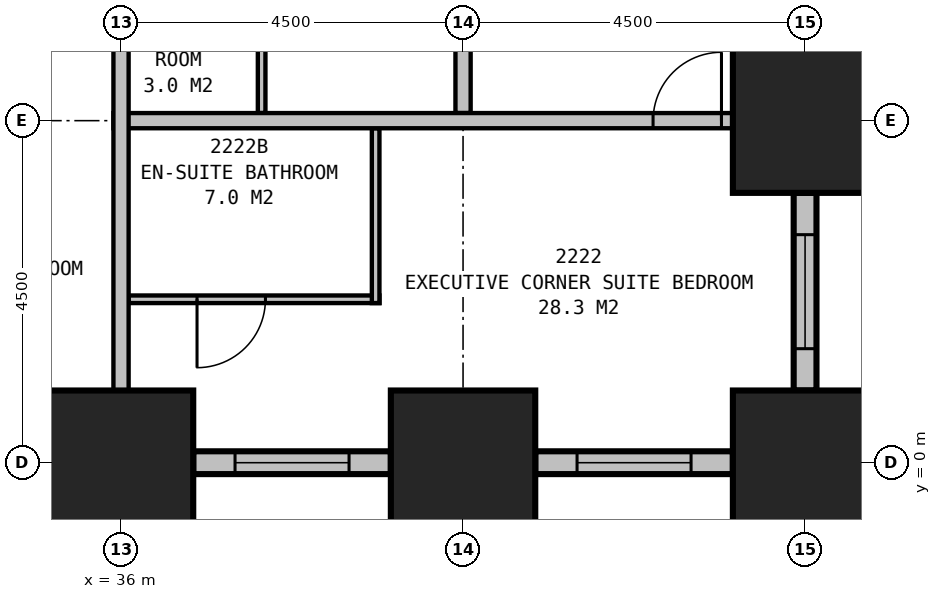
"""IFC4 building model, lengths in metres.
Left out: names, types, materials, properties, quantities, classifications, styles, units other than length and angle.
Written with IfcOpenShell. Run it as: python <this file> out.ifc"""

import sys

from ifc_helpers import new_model, si_unit, direction, frame, frame_2d, origin, origin_2d, place, context, subcontext, project, spatial, rectangle, extrude, element, fill, save


model = new_model("IFC4")
c1 = context("Model", 3, precision=1e-05, world=origin(), true_north=direction((0.0, 1.0)))
c2 = subcontext(c1, "Body", "Model", "MODEL_VIEW")
j1 = project(units=[si_unit("LENGTHUNIT", "METRE"), si_unit("PLANEANGLEUNIT", "RADIAN")], contexts=[c1])
p1 = place(None, origin())
s1 = spatial("IfcSite", under=j1, at=p1, CompositionType="ELEMENT")
p2 = place(p1, origin())
s2 = spatial("IfcBuilding", under=s1, at=p2, CompositionType="ELEMENT")
p3 = place(p2, frame((0.0, 0.0, 89.9)))
s3 = spatial("IfcBuildingStorey", under=s2, at=p3, CompositionType="ELEMENT", Elevation=89.9)
for number, where, z_axis, x_axis in (
    (1, (36.0, 0.0, 0.0), (0.0, 0.0, 1.0), (1.0, 0.0, 0.0)),
    (2, (40.5, 0.0, 0.0), (0.0, 0.0, 1.0), (1.0, 0.0, 0.0)),
    (3, (45.0, 0.0, 0.0), (0.0, 0.0, 1.0), (1.0, 0.0, 0.0)),
    (4, (45.0, 4.5, 0.0), (0.0, 0.0, 1.0), (1.0, 0.0, 0.0)),
):
    element("IfcColumn", number, at=place(p3, frame(where, z_axis=z_axis, x_axis=x_axis)), inside=s3, PredefinedType="COLUMN", context=c2, shape_type="SweptSolid", body=[
        extrude(rectangle(XDim=1.9, YDim=1.9, at=origin_2d()), origin(), (0.0, 0.0, 1.0), 3.5),
    ])
p4 = place(p3, frame((36.95, 0.0, 0.0), z_axis=(0.0, 0.0, 1.0), x_axis=(1.0, 0.0, 0.0)))
e5 = element("IfcWall", 5, at=p4, inside=s3, PredefinedType="STANDARD", context=c2, shape_type="SweptSolid", body=[
    extrude(rectangle(XDim=2.6, YDim=0.3, at=frame_2d((1.3, 0.0))), origin(), (0.0, 0.0, 1.0), 2.15),
])
p5 = place(p4, frame((0.55, 0.0, 0.5)))
e6 = element("IfcOpeningElement", 6, at=p5, cuts=e5, PredefinedType="OPENING", context=c2, shape_type="SweptSolid", body=[
    extrude(rectangle(XDim=1.5, YDim=1.5, at=frame_2d((0.75, 0.75))), frame((0.0, 0.16, 0.0), z_axis=(0.0, -1.0, 0.0), x_axis=(1.0, 0.0, 0.0)), (0.0, 0.0, 1.0), 0.32),
])
p6 = place(p3, frame((41.45, 0.0, 0.0), z_axis=(0.0, 0.0, 1.0), x_axis=(1.0, 0.0, 0.0)))
e7 = element("IfcWall", 7, at=p6, inside=s3, PredefinedType="STANDARD", context=c2, shape_type="SweptSolid", body=[
    extrude(rectangle(XDim=2.6, YDim=0.3, at=frame_2d((1.3, 0.0))), origin(), (0.0, 0.0, 1.0), 2.15),
])
p7 = place(p6, frame((0.55, 0.0, 0.5)))
e8 = element("IfcOpeningElement", 8, at=p7, cuts=e7, PredefinedType="OPENING", context=c2, shape_type="SweptSolid", body=[
    extrude(rectangle(XDim=1.5, YDim=1.5, at=frame_2d((0.75, 0.75))), frame((0.0, 0.16, 0.0), z_axis=(0.0, -1.0, 0.0), x_axis=(1.0, 0.0, 0.0)), (0.0, 0.0, 1.0), 0.32),
])
p8 = place(p3, frame((45.0, 0.95, 0.0), z_axis=(0.0, 0.0, 1.0), x_axis=(0.0, 1.0, 0.0)))
e9 = element("IfcWall", 9, at=p8, inside=s3, PredefinedType="STANDARD", context=c2, shape_type="SweptSolid", body=[
    extrude(rectangle(XDim=2.6, YDim=0.3, at=frame_2d((1.3, 0.0))), origin(), (0.0, 0.0, 1.0), 2.15),
])
p9 = place(p8, frame((0.55, 0.0, 0.5)))
e10 = element("IfcOpeningElement", 10, at=p9, cuts=e9, PredefinedType="OPENING", context=c2, shape_type="SweptSolid", body=[
    extrude(rectangle(XDim=1.5, YDim=1.5, at=frame_2d((0.75, 0.75))), frame((0.0, 0.16, 0.0), z_axis=(0.0, -1.0, 0.0), x_axis=(1.0, 0.0, 0.0)), (0.0, 0.0, 1.0), 0.32),
])
p10 = place(p3, frame((36.0, 10.6, 0.0), z_axis=(0.0, 0.0, 1.0), x_axis=(0.0, -1.0, 0.0)))
e11 = element("IfcWall", 11, at=p10, inside=s3, PredefinedType="PARTITIONING", context=c2, shape_type="SweptSolid", body=[
    extrude(rectangle(XDim=10.6, YDim=0.2, at=frame_2d((5.3, 0.0))), origin(), (0.0, 0.0, 1.0), 2.25),
])
p11 = place(p3, frame((35.9, 4.5, 0.0), z_axis=(0.0, 0.0, 1.0), x_axis=(1.0, 0.0, 0.0)))
e12 = element("IfcWall", 12, at=p11, inside=s3, PredefinedType="PARTITIONING", context=c2, shape_type="SweptSolid", body=[
    extrude(rectangle(XDim=9.1, YDim=0.2, at=frame_2d((4.55, 0.0))), origin(), (0.0, 0.0, 1.0), 3.25),
])
p12 = place(p11, frame((7.1, 0.0, 0.0)))
e13 = element("IfcOpeningElement", 13, at=p12, cuts=e12, PredefinedType="OPENING", context=c2, shape_type="SweptSolid", body=[
    extrude(rectangle(XDim=0.9, YDim=2.1, at=frame_2d((0.45, 1.05))), frame((0.0, 0.11, 0.0), z_axis=(0.0, -1.0, 0.0), x_axis=(1.0, 0.0, 0.0)), (0.0, 0.0, 1.0), 0.22),
])
p13 = place(p3, frame((40.5, 4.6, 0.0), z_axis=(0.0, 0.0, 1.0), x_axis=(0.0, 1.0, 0.0)))
e14 = element("IfcWall", 14, at=p13, inside=s3, PredefinedType="PARTITIONING", context=c2, shape_type="SweptSolid", body=[
    extrude(rectangle(XDim=8.8, YDim=0.2, at=frame_2d((4.4, 0.0))), origin(), (0.0, 0.0, 1.0), 2.25),
])
p14 = place(p13, frame((4.05, 0.0, 0.0)))
e15 = element("IfcOpeningElement", 15, at=p14, cuts=e14, PredefinedType="OPENING", context=c2, shape_type="SweptSolid", body=[
    extrude(rectangle(XDim=0.9, YDim=2.1, at=frame_2d((0.45, 1.05))), frame((0.0, 0.11, 0.0), z_axis=(0.0, -1.0, 0.0), x_axis=(1.0, 0.0, 0.0)), (0.0, 0.0, 1.0), 0.22),
])
p15 = place(p3, frame((37.85, 4.6, 0.0), z_axis=(0.0, 0.0, 1.0), x_axis=(0.0, 1.0, 0.0)))
e16 = element("IfcWall", 16, at=p15, inside=s3, PredefinedType="PLUMBINGWALL", context=c2, shape_type="SweptSolid", body=[
    extrude(rectangle(XDim=2.0, YDim=0.1, at=frame_2d((1.0, 0.0))), origin(), (0.0, 0.0, 1.0), 3.25),
])
p16 = place(p3, frame((39.35, 4.4, 0.0), z_axis=(0.0, 0.0, 1.0), x_axis=(0.0, -1.0, 0.0)))
e17 = element("IfcWall", 17, at=p16, inside=s3, PredefinedType="PLUMBINGWALL", context=c2, shape_type="SweptSolid", body=[
    extrude(rectangle(XDim=2.3, YDim=0.1, at=frame_2d((1.15, 0.0))), origin(), (0.0, 0.0, 1.0), 3.25),
])
p17 = place(p3, frame((36.1, 2.15, 0.0), z_axis=(0.0, 0.0, 1.0), x_axis=(1.0, 0.0, 0.0)))
e18 = element("IfcWall", 18, at=p17, inside=s3, PredefinedType="PLUMBINGWALL", context=c2, shape_type="SweptSolid", body=[
    extrude(rectangle(XDim=3.3, YDim=0.1, at=frame_2d((1.65, 0.0))), origin(), (0.0, 0.0, 1.0), 3.25),
])
p18 = place(p17, frame((1.8, 0.0, 0.0), z_axis=(0.0, 0.0, 1.0), x_axis=(-1.0, 0.0, 0.0)))
e19 = element("IfcOpeningElement", 19, at=p18, cuts=e18, PredefinedType="OPENING", context=c2, shape_type="SweptSolid", body=[
    extrude(rectangle(XDim=0.9, YDim=2.1, at=frame_2d((0.45, 1.05))), frame((0.0, 0.06, 0.0), z_axis=(0.0, -1.0, 0.0), x_axis=(1.0, 0.0, 0.0)), (0.0, 0.0, 1.0), 0.12),
])
p19 = place(p5, origin())
e20 = element("IfcWindow", 20, at=p19, inside=s3, PartitioningType="SINGLE_PANEL", PredefinedType="WINDOW", context=c2, shape_type="SweptSolid", body=[
    extrude(rectangle(XDim=1.5, YDim=1.5, at=frame_2d((0.75, 0.75))), frame((0.0, 0.03, 0.0), z_axis=(0.0, -1.0, 0.0), x_axis=(1.0, 0.0, 0.0)), (0.0, 0.0, 1.0), 0.06),
])
fill(e6, e20)
p20 = place(p7, origin())
e21 = element("IfcWindow", 21, at=p20, inside=s3, PartitioningType="SINGLE_PANEL", PredefinedType="WINDOW", context=c2, shape_type="SweptSolid", body=[
    extrude(rectangle(XDim=1.5, YDim=1.5, at=frame_2d((0.75, 0.75))), frame((0.0, 0.03, 0.0), z_axis=(0.0, -1.0, 0.0), x_axis=(1.0, 0.0, 0.0)), (0.0, 0.0, 1.0), 0.06),
])
fill(e8, e21)
p21 = place(p9, origin())
e22 = element("IfcWindow", 22, at=p21, inside=s3, PartitioningType="SINGLE_PANEL", PredefinedType="WINDOW", context=c2, shape_type="SweptSolid", body=[
    extrude(rectangle(XDim=1.5, YDim=1.5, at=frame_2d((0.75, 0.75))), frame((0.0, 0.03, 0.0), z_axis=(0.0, -1.0, 0.0), x_axis=(1.0, 0.0, 0.0)), (0.0, 0.0, 1.0), 0.06),
])
fill(e10, e22)
p22 = place(p12, origin())
e23 = element("IfcDoor", 23, at=p22, inside=s3, OperationType="SINGLE_SWING_RIGHT", PredefinedType="DOOR", context=c2, shape_type="SweptSolid", body=[
    extrude(rectangle(XDim=0.9, YDim=2.1, at=frame_2d((0.45, 1.05))), frame((0.0, 0.025, 0.0), z_axis=(0.0, -1.0, 0.0), x_axis=(1.0, 0.0, 0.0)), (0.0, 0.0, 1.0), 0.05),
])
fill(e13, e23)
p23 = place(p18, origin())
e24 = element("IfcDoor", 24, at=p23, inside=s3, OperationType="SINGLE_SWING_RIGHT", PredefinedType="DOOR", context=c2, shape_type="SweptSolid", body=[
    extrude(rectangle(XDim=0.9, YDim=2.1, at=frame_2d((0.45, 1.05))), frame((0.0, 0.025, 0.0), z_axis=(0.0, -1.0, 0.0), x_axis=(1.0, 0.0, 0.0)), (0.0, 0.0, 1.0), 0.05),
])
fill(e19, e24)
save(model, sys.argv[1])
